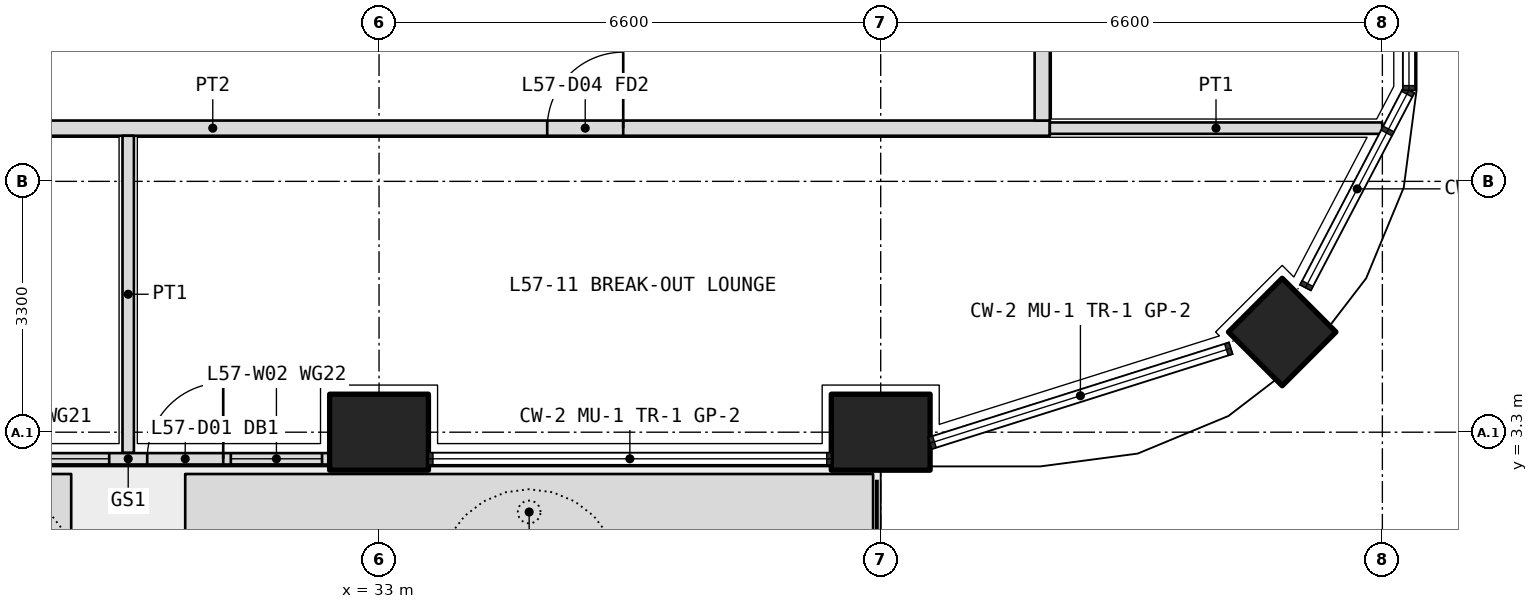
"""IFC4 building model, lengths in metres.
Left out: names, types, materials, properties, quantities, classifications, styles, units other than length and angle.
Written with IfcOpenShell. Run it as: python <this file> out.ifc"""

import sys

from ifc_helpers import new_model, si_unit, direction, frame, frame_2d, origin, origin_2d, place, context, subcontext, project, spatial, polyline, rectangle, outline, extrude, element, fill, save


model = new_model("IFC4")
c1 = context("Model", 3, precision=1e-05, world=origin(), true_north=direction((0.0, 1.0)))
c2 = subcontext(c1, "Body", "Model", "MODEL_VIEW")
j1 = project(units=[si_unit("LENGTHUNIT", "METRE"), si_unit("PLANEANGLEUNIT", "RADIAN")], contexts=[c1])
p1 = place(None, origin())
s1 = spatial("IfcSite", under=j1, at=p1, CompositionType="ELEMENT")
p2 = place(p1, origin())
s2 = spatial("IfcBuilding", under=s1, at=p2, CompositionType="ELEMENT")
p3 = place(p2, frame((0.0, 0.0, 250.2)))
s3 = spatial("IfcBuildingStorey", under=s2, at=p3, CompositionType="ELEMENT", Elevation=250.2)
p4 = place(p3, frame((44.882, 4.618, 0.0), z_axis=(0.0, 0.0, 1.0), x_axis=(0.707106781187, 0.707106781187, 0.0)))
e1 = element("IfcColumn", 1, at=p4, inside=s3, PredefinedType="COLUMN", context=c2, shape_type="SweptSolid", body=[
    extrude(rectangle(XDim=1.0, YDim=1.0, at=origin_2d()), origin(), (0.0, 0.0, 1.0), 4.2),
])
for number, where, z_axis, x_axis in (
    (2, (33.0, 3.3, 0.0), (0.0, 0.0, 1.0), (1.0, 0.0, 0.0)),
    (3, (39.6, 3.3, 0.0), (0.0, 0.0, 1.0), (1.0, 0.0, 0.0)),
):
    element("IfcColumn", number, at=place(p3, frame(where, z_axis=z_axis, x_axis=x_axis)), inside=s3, PredefinedType="COLUMN", context=c2, shape_type="SweptSolid", body=[
        extrude(rectangle(XDim=1.3, YDim=1.0, at=origin_2d()), origin(), (0.0, 0.0, 1.0), 4.2),
    ])
p5 = place(p3, origin())
e4 = element("IfcWall", 4, at=p5, inside=s3, PredefinedType="USERDEFINED", context=c2, shape_type="SweptSolid", body=[
    extrude(outline(polyline([(26.5, 1.75), (28.95, 1.75), (28.95, 2.75), (26.5, 2.75), (26.5, 1.75)]), holes=[polyline([(26.65, 1.9), (28.8, 1.9), (28.8, 2.6), (26.65, 2.6), (26.65, 1.9)])]), origin(), (0.0, 0.0, 1.0), 1.05),
])
p6 = place(p3, origin())
e5 = element("IfcWall", 5, at=p6, inside=s3, PredefinedType="USERDEFINED", context=c2, shape_type="SweptSolid", body=[
    extrude(outline(polyline([(30.45, 1.75), (39.5, 1.75), (39.5, 2.75), (30.45, 2.75), (30.45, 1.75)]), holes=[polyline([(30.6, 1.9), (39.35, 1.9), (39.35, 2.6), (30.6, 2.6), (30.6, 1.9)])]), origin(), (0.0, 0.0, 1.0), 1.05),
])
p7 = place(p3, frame((27.05, 2.95, 0.0), z_axis=(0.0, 0.0, 1.0), x_axis=(1.0, 0.0, 0.0)))
e6 = element("IfcWall", 6, at=p7, inside=s3, PredefinedType="SOLIDWALL", context=c2, shape_type="SweptSolid", body=[
    extrude(rectangle(XDim=5.3, YDim=0.15, at=frame_2d((2.65, 0.0))), origin(), (0.0, 0.0, 1.0), 2.7),
])
p8 = place(p7, frame((2.9, 0.0, 0.0)))
e7 = element("IfcOpeningElement", 7, at=p8, cuts=e6, PredefinedType="OPENING", context=c2, shape_type="SweptSolid", body=[
    extrude(rectangle(XDim=1.0, YDim=2.4, at=frame_2d((0.5, 1.2))), frame((0.0, 0.085, 0.0), z_axis=(0.0, -1.0, 0.0), x_axis=(1.0, 0.0, 0.0)), (0.0, 0.0, 1.0), 0.17),
])
p9 = place(p7, frame((0.1, 0.0, 0.1)))
e8 = element("IfcOpeningElement", 8, at=p9, cuts=e6, PredefinedType="OPENING", context=c2, shape_type="SweptSolid", body=[
    extrude(rectangle(XDim=2.3, YDim=2.3, at=frame_2d((1.15, 1.15))), frame((0.0, 0.085, 0.0), z_axis=(0.0, -1.0, 0.0), x_axis=(1.0, 0.0, 0.0)), (0.0, 0.0, 1.0), 0.17),
])
p10 = place(p7, frame((4.0, 0.0, 0.1)))
e9 = element("IfcOpeningElement", 9, at=p10, cuts=e6, PredefinedType="OPENING", context=c2, shape_type="SweptSolid", body=[
    extrude(rectangle(XDim=1.2, YDim=2.3, at=frame_2d((0.6, 1.15))), frame((0.0, 0.085, 0.0), z_axis=(0.0, -1.0, 0.0), x_axis=(1.0, 0.0, 0.0)), (0.0, 0.0, 1.0), 0.17),
])
p11 = place(p3, frame((19.8, 7.3, 0.0), z_axis=(0.0, 0.0, 1.0), x_axis=(1.0, 0.0, 0.0)))
e10 = element("IfcWall", 10, at=p11, inside=s3, PredefinedType="PARTITIONING", context=c2, shape_type="SweptSolid", body=[
    extrude(rectangle(XDim=22.025, YDim=0.2, at=frame_2d((11.012, 0.0))), origin(), (0.0, 0.0, 1.0), 3.0),
])
p12 = place(p11, frame((4.35, 0.0, 0.0)))
e11 = element("IfcOpeningElement", 11, at=p12, cuts=e10, PredefinedType="OPENING", context=c2, shape_type="SweptSolid", body=[
    extrude(rectangle(XDim=1.2, YDim=2.1, at=frame_2d((0.6, 1.05))), frame((0.0, 0.11, 0.0), z_axis=(0.0, -1.0, 0.0), x_axis=(1.0, 0.0, 0.0)), (0.0, 0.0, 1.0), 0.22),
])
p13 = place(p11, frame((15.413, 0.0, 0.0)))
e12 = element("IfcOpeningElement", 12, at=p13, cuts=e10, PredefinedType="OPENING", context=c2, shape_type="SweptSolid", body=[
    extrude(rectangle(XDim=1.0, YDim=2.1, at=frame_2d((0.5, 1.05))), frame((0.0, 0.11, 0.0), z_axis=(0.0, -1.0, 0.0), x_axis=(1.0, 0.0, 0.0)), (0.0, 0.0, 1.0), 0.22),
])
p14 = place(p3, frame((41.725, 7.4, 0.0), z_axis=(0.0, 0.0, 1.0), x_axis=(0.0, 1.0, 0.0)))
e13 = element("IfcWall", 13, at=p14, inside=s3, PredefinedType="PARTITIONING", context=c2, shape_type="SweptSolid", body=[
    extrude(rectangle(XDim=31.4, YDim=0.2, at=frame_2d((15.7, 0.0))), origin(), (0.0, 0.0, 1.0), 3.0),
])
p15 = place(p14, frame((4.0, 0.0, 0.0)))
e14 = element("IfcOpeningElement", 14, at=p15, cuts=e13, PredefinedType="OPENING", context=c2, shape_type="SweptSolid", body=[
    extrude(rectangle(XDim=1.0, YDim=2.1, at=frame_2d((0.5, 1.05))), frame((0.0, 0.11, 0.0), z_axis=(0.0, -1.0, 0.0), x_axis=(1.0, 0.0, 0.0)), (0.0, 0.0, 1.0), 0.22),
])
p16 = place(p14, frame((10.25, 0.0, 0.0)))
e15 = element("IfcOpeningElement", 15, at=p16, cuts=e13, PredefinedType="OPENING", context=c2, shape_type="SweptSolid", body=[
    extrude(rectangle(XDim=1.0, YDim=2.1, at=frame_2d((0.5, 1.05))), frame((0.0, 0.11, 0.0), z_axis=(0.0, -1.0, 0.0), x_axis=(1.0, 0.0, 0.0)), (0.0, 0.0, 1.0), 0.22),
])
p17 = place(p14, frame((13.4, 0.0, 0.0)))
e16 = element("IfcOpeningElement", 16, at=p17, cuts=e13, PredefinedType="OPENING", context=c2, shape_type="SweptSolid", body=[
    extrude(rectangle(XDim=1.0, YDim=2.1, at=frame_2d((0.5, 1.05))), frame((0.0, 0.11, 0.0), z_axis=(0.0, -1.0, 0.0), x_axis=(1.0, 0.0, 0.0)), (0.0, 0.0, 1.0), 0.22),
])
p18 = place(p14, frame((16.75, 0.0, 0.0)))
e17 = element("IfcOpeningElement", 17, at=p18, cuts=e13, PredefinedType="OPENING", context=c2, shape_type="SweptSolid", body=[
    extrude(rectangle(XDim=0.9, YDim=2.1, at=frame_2d((0.45, 1.05))), frame((0.0, 0.11, 0.0), z_axis=(0.0, -1.0, 0.0), x_axis=(1.0, 0.0, 0.0)), (0.0, 0.0, 1.0), 0.22),
])
p19 = place(p14, frame((20.05, 0.0, 0.0)))
e18 = element("IfcOpeningElement", 18, at=p19, cuts=e13, PredefinedType="OPENING", context=c2, shape_type="SweptSolid", body=[
    extrude(rectangle(XDim=1.2, YDim=2.1, at=frame_2d((0.6, 1.05))), frame((0.0, 0.11, 0.0), z_axis=(0.0, -1.0, 0.0), x_axis=(1.0, 0.0, 0.0)), (0.0, 0.0, 1.0), 0.22),
])
p20 = place(p14, frame((26.3, 0.0, 0.0)))
e19 = element("IfcOpeningElement", 19, at=p20, cuts=e13, PredefinedType="OPENING", context=c2, shape_type="SweptSolid", body=[
    extrude(rectangle(XDim=1.2, YDim=2.1, at=frame_2d((0.6, 1.05))), frame((0.0, 0.11, 0.0), z_axis=(0.0, -1.0, 0.0), x_axis=(1.0, 0.0, 0.0)), (0.0, 0.0, 1.0), 0.22),
])
p21 = place(p3, frame((46.198, 7.3, 0.0), z_axis=(0.0, 0.0, 1.0), x_axis=(-1.0, 0.0, 0.0)))
e20 = element("IfcWall", 20, at=p21, inside=s3, PredefinedType="PARTITIONING", context=c2, shape_type="SweptSolid", body=[
    extrude(rectangle(XDim=4.373, YDim=0.15, at=frame_2d((2.186, 0.0))), origin(), (0.0, 0.0, 1.0), 2.7),
])
p22 = place(p3, frame((29.7, 3.03, 0.0), z_axis=(0.0, 0.0, 1.0), x_axis=(0.0, 1.0, 0.0)))
e21 = element("IfcWall", 21, at=p22, inside=s3, PredefinedType="PARTITIONING", context=c2, shape_type="SweptSolid", body=[
    extrude(rectangle(XDim=4.17, YDim=0.15, at=frame_2d((2.085, 0.0))), origin(), (0.0, 0.0, 1.0), 2.7),
])
p23 = place(p8, origin())
e22 = element("IfcDoor", 22, at=p23, inside=s3, OperationType="SINGLE_SWING_RIGHT", PredefinedType="DOOR", context=c2, shape_type="SweptSolid", body=[
    extrude(rectangle(XDim=1.0, YDim=2.4, at=frame_2d((0.5, 1.2))), frame((0.0, 0.025, 0.0), z_axis=(0.0, -1.0, 0.0), x_axis=(1.0, 0.0, 0.0)), (0.0, 0.0, 1.0), 0.05),
])
fill(e7, e22)
p24 = place(p9, origin())
e23 = element("IfcWindow", 23, at=p24, inside=s3, PartitioningType="SINGLE_PANEL", PredefinedType="WINDOW", context=c2, shape_type="SweptSolid", body=[
    extrude(rectangle(XDim=2.3, YDim=2.3, at=frame_2d((1.15, 1.15))), frame((0.0, 0.03, 0.0), z_axis=(0.0, -1.0, 0.0), x_axis=(1.0, 0.0, 0.0)), (0.0, 0.0, 1.0), 0.06),
])
fill(e8, e23)
p25 = place(p10, origin())
e24 = element("IfcWindow", 24, at=p25, inside=s3, PartitioningType="SINGLE_PANEL", PredefinedType="WINDOW", context=c2, shape_type="SweptSolid", body=[
    extrude(rectangle(XDim=1.2, YDim=2.3, at=frame_2d((0.6, 1.15))), frame((0.0, 0.03, 0.0), z_axis=(0.0, -1.0, 0.0), x_axis=(1.0, 0.0, 0.0)), (0.0, 0.0, 1.0), 0.06),
])
fill(e9, e24)
p26 = place(p13, origin())
e25 = element("IfcDoor", 25, at=p26, inside=s3, OperationType="SINGLE_SWING_RIGHT", PredefinedType="DOOR", context=c2, shape_type="SweptSolid", body=[
    extrude(rectangle(XDim=1.0, YDim=2.1, at=frame_2d((0.5, 1.05))), frame((0.0, 0.025, 0.0), z_axis=(0.0, -1.0, 0.0), x_axis=(1.0, 0.0, 0.0)), (0.0, 0.0, 1.0), 0.05),
])
fill(e12, e25)
save(model, sys.argv[1])
